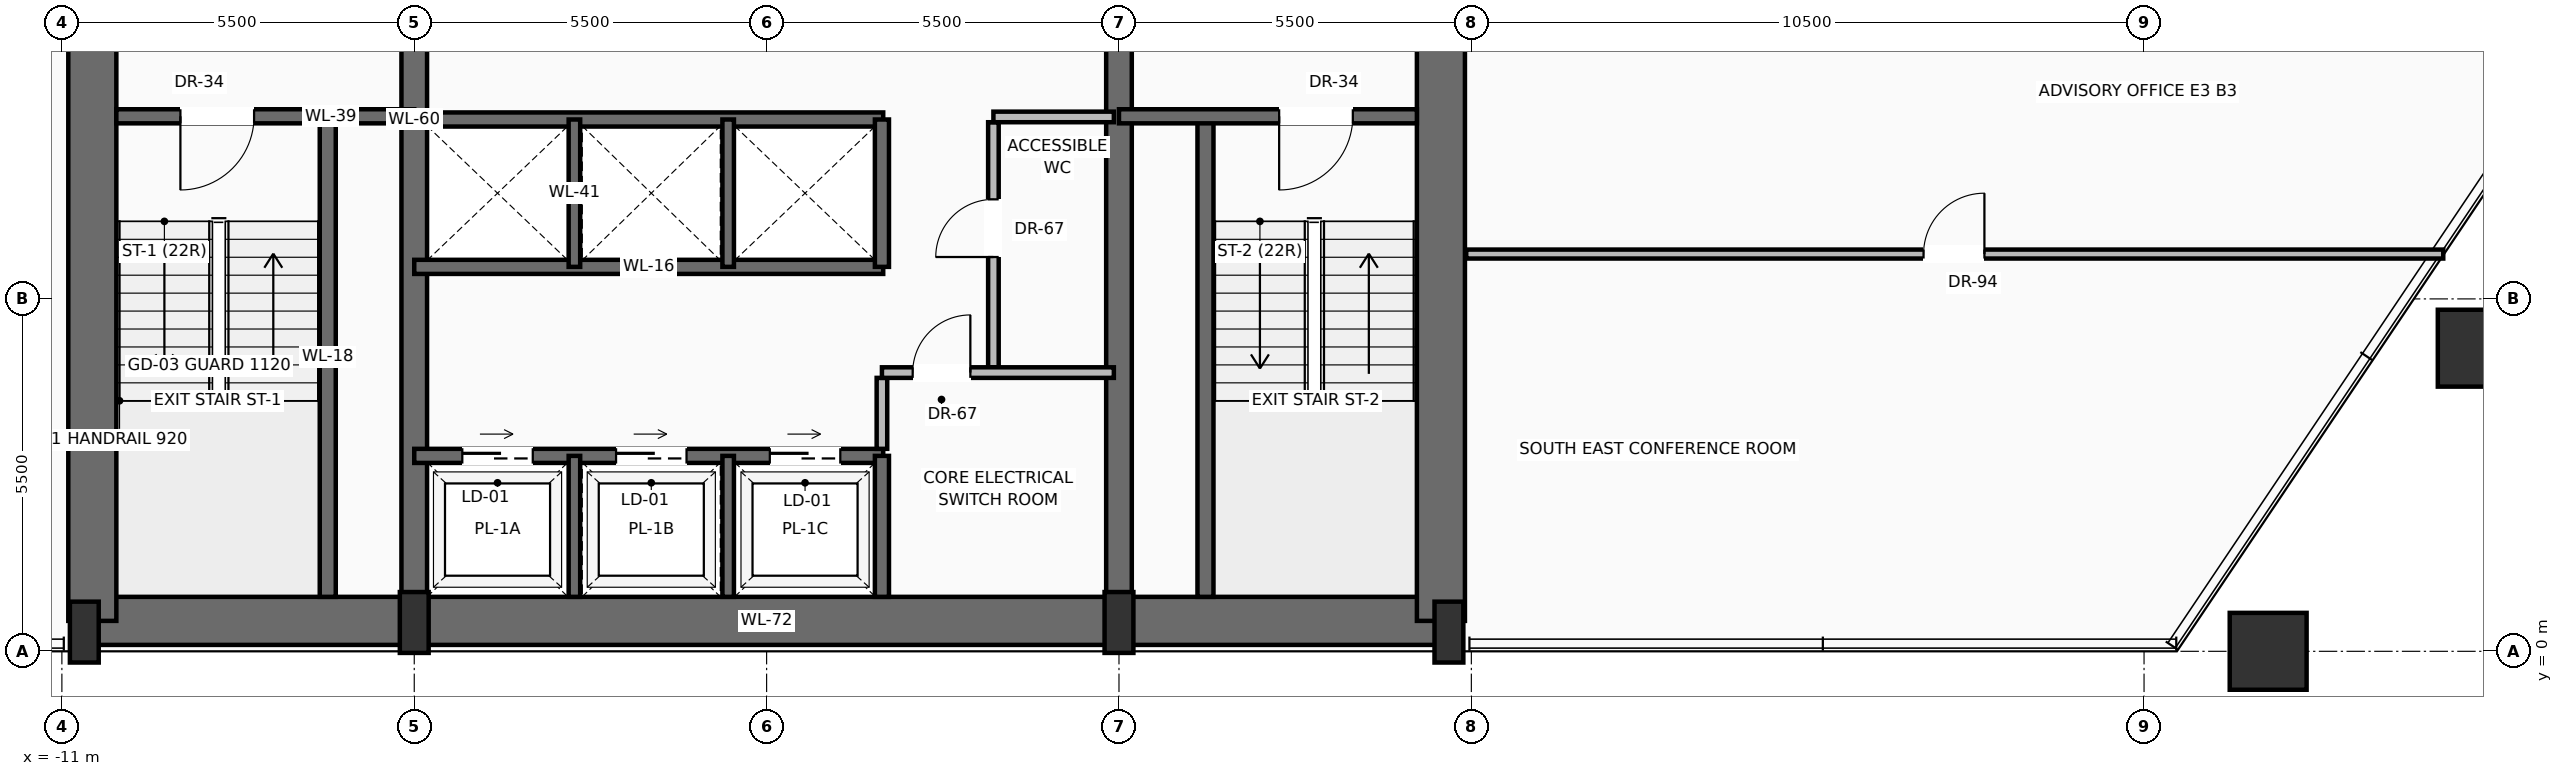
"""IFC4 building model, lengths in metres.
Left out: names, types, materials, properties, quantities, classifications, styles, units other than length and angle.
Written with IfcOpenShell. Run it as: python <this file> out.ifc"""

import sys

from ifc_helpers import new_model, si_unit, direction, frame, frame_2d, origin, origin_2d, place, context, subcontext, project, spatial, rectangle, hollow_rectangle, extrude, source, transform, mapped, element, fill, save


model = new_model("IFC4")
c1 = context("Model", 3, precision=1e-05, world=origin(), true_north=direction((0.0, 1.0)))
c2 = subcontext(c1, "Body", "Model", "MODEL_VIEW")
j1 = project(units=[si_unit("LENGTHUNIT", "METRE"), si_unit("PLANEANGLEUNIT", "RADIAN")], contexts=[c1])
p1 = place(None, origin())
s1 = spatial("IfcSite", under=j1, at=p1, CompositionType="ELEMENT")
p2 = place(p1, origin())
s2 = spatial("IfcBuilding", under=s1, at=p2, CompositionType="ELEMENT")
p3 = place(p2, frame((0.0, 0.0, 95.1)))
s3 = spatial("IfcBuildingStorey", under=s2, at=p3, CompositionType="ELEMENT", Elevation=95.1)
p4 = place(p3, frame((-10.65, 0.475, 0.0), z_axis=(0.0, 0.0, 1.0), x_axis=(1.0, 0.0, 0.0)))
e1 = element("IfcWall", 1, at=p4, inside=s3, PredefinedType="SHEAR", context=c2, shape_type="SweptSolid", body=[
    extrude(rectangle(XDim=21.3, YDim=0.75, at=frame_2d((10.65, 0.0))), origin(), (0.0, 0.0, 1.0), 3.45),
])
for number, where, z_axis, x_axis in (
    (2, (-10.525, 0.475, 0.0), (0.0, 0.0, 1.0), (0.0, 1.0, 0.0)),
    (3, (10.525, 0.475, 0.0), (0.0, 0.0, 1.0), (0.0, 1.0, 0.0)),
):
    element("IfcWall", number, at=place(p3, frame(where, z_axis=z_axis, x_axis=x_axis)), inside=s3, PredefinedType="SHEAR", context=c2, shape_type="SweptSolid", body=[
        extrude(rectangle(XDim=15.65, YDim=0.75, at=frame_2d((7.825, 0.0))), origin(), (0.0, 0.0, 1.0), 3.45),
    ])
p5 = place(p3, frame((-5.5, 0.475, 0.0), z_axis=(0.0, 0.0, 1.0), x_axis=(0.0, 1.0, 0.0)))
e4 = element("IfcWall", 4, at=p5, inside=s3, PredefinedType="SHEAR", context=c2, shape_type="SweptSolid", body=[
    extrude(rectangle(XDim=15.65, YDim=0.4, at=frame_2d((7.825, 0.0))), origin(), (0.0, 0.0, 1.0), 3.45),
])
p6 = place(p5, frame((9.025, 0.0, 0.0)))
e5 = element("IfcOpeningElement", 5, at=p6, cuts=e4, PredefinedType="OPENING", context=c2, shape_type="SweptSolid", body=[
    extrude(rectangle(XDim=1.1, YDim=2.2, at=frame_2d((0.55, 1.1))), frame((0.0, 0.21, 0.0), z_axis=(0.0, -1.0, 0.0), x_axis=(1.0, 0.0, 0.0)), (0.0, 0.0, 1.0), 0.42),
])
p7 = place(p3, frame((5.5, 0.475, 0.0), z_axis=(0.0, 0.0, 1.0), x_axis=(0.0, 1.0, 0.0)))
e6 = element("IfcWall", 6, at=p7, inside=s3, PredefinedType="SHEAR", context=c2, shape_type="SweptSolid", body=[
    extrude(rectangle(XDim=15.65, YDim=0.4, at=frame_2d((7.825, 0.0))), origin(), (0.0, 0.0, 1.0), 3.45),
])
p8 = place(p7, frame((9.025, 0.0, 0.0)))
e7 = element("IfcOpeningElement", 7, at=p8, cuts=e6, PredefinedType="OPENING", context=c2, shape_type="SweptSolid", body=[
    extrude(rectangle(XDim=1.1, YDim=2.2, at=frame_2d((0.55, 1.1))), frame((0.0, 0.21, 0.0), z_axis=(0.0, -1.0, 0.0), x_axis=(1.0, 0.0, 0.0)), (0.0, 0.0, 1.0), 0.42),
])
m1 = source(origin(), c2, "Body", "SweptSolid", [
    extrude(rectangle(XDim=0.45, YDim=0.95, at=origin_2d()), origin(), (0.0, 0.0, 1.0), 3.7),
])
for number, where, z_axis, x_axis in (
    (8, (-10.65, 0.3, 0.0), (0.0, 0.0, 1.0), (1.0, 0.0, 0.0)),
    (9, (-5.5, 0.45, 0.0), (0.0, 0.0, 1.0), (1.0, 0.0, 0.0)),
    (10, (5.5, 0.45, 0.0), (0.0, 0.0, 1.0), (1.0, 0.0, 0.0)),
    (11, (10.65, 0.3, 0.0), (0.0, 0.0, 1.0), (1.0, 0.0, 0.0)),
):
    element("IfcColumn", number, at=place(p3, frame(where, z_axis=z_axis, x_axis=x_axis)), inside=s3, PredefinedType="PILASTER", context=c2, shape_type="MappedRepresentation", body=[
        mapped(m1, transform((0.0, 0.0, 0.0), scale=1.0)),
    ])
m2 = source(origin(), c2, "Body", "SweptSolid", [
    extrude(hollow_rectangle(XDim=1.2, YDim=1.2, WallThickness=0.06, at=origin_2d()), origin(), (0.0, 0.0, 1.0), 3.691),
])
p9 = place(p3, frame((23.437, 0.0, 0.004), z_axis=(0.012036961087, 0.0, 0.99992755316), x_axis=(0.0, 1.0, 0.0)))
e12 = element("IfcColumn", 12, at=p9, inside=s3, PredefinedType="COLUMN", context=c2, shape_type="MappedRepresentation", body=[
    mapped(m2, transform((0.0, 0.0, 0.0), scale=1.0)),
])
m3 = source(origin(), c2, "Body", "SweptSolid", [
    extrude(hollow_rectangle(XDim=1.2, YDim=1.2, WallThickness=0.06, at=origin_2d()), origin(), (0.0, 0.0, 1.0), 3.692),
])
p10 = place(p3, frame((26.685, 4.731, 0.004), z_axis=(-0.000396800785, -0.016004298321, 0.99987184428), x_axis=(0.999692785574, -0.024785771543, 0.0)))
e13 = element("IfcColumn", 13, at=p10, inside=s3, PredefinedType="COLUMN", context=c2, shape_type="MappedRepresentation", body=[
    mapped(m3, transform((0.0, 0.0, 0.0), scale=1.0)),
])
p11 = place(p3, frame((-6.85, 0.85, 0.0), z_axis=(0.0, 0.0, 1.0), x_axis=(0.0, 1.0, 0.0)))
e14 = element("IfcWall", 14, at=p11, inside=s3, PredefinedType="SOLIDWALL", context=c2, shape_type="SweptSolid", body=[
    extrude(rectangle(XDim=7.5, YDim=0.25, at=frame_2d((3.75, 0.0))), origin(), (0.0, 0.0, 1.0), 3.45),
])
p12 = place(p3, frame((-5.5, 8.35, 0.0), z_axis=(0.0, 0.0, 1.0), x_axis=(-1.0, 0.0, 0.0)))
e15 = element("IfcWall", 15, at=p12, inside=s3, PredefinedType="SOLIDWALL", context=c2, shape_type="SweptSolid", body=[
    extrude(rectangle(XDim=4.65, YDim=0.22, at=frame_2d((2.325, 0.0))), origin(), (0.0, 0.0, 1.0), 3.45),
])
p13 = place(p12, frame((2.5, 0.0, 0.0)))
e16 = element("IfcOpeningElement", 16, at=p13, cuts=e15, PredefinedType="OPENING", context=c2, shape_type="SweptSolid", body=[
    extrude(rectangle(XDim=1.15, YDim=2.2, at=frame_2d((0.575, 1.1))), frame((0.0, 0.12, 0.0), z_axis=(0.0, -1.0, 0.0), x_axis=(1.0, 0.0, 0.0)), (0.0, 0.0, 1.0), 0.24),
])
p14 = place(p3, frame((6.85, 0.85, 0.0), z_axis=(0.0, 0.0, 1.0), x_axis=(0.0, 1.0, 0.0)))
e17 = element("IfcWall", 17, at=p14, inside=s3, PredefinedType="SOLIDWALL", context=c2, shape_type="SweptSolid", body=[
    extrude(rectangle(XDim=7.5, YDim=0.25, at=frame_2d((3.75, 0.0))), origin(), (0.0, 0.0, 1.0), 3.45),
])
p15 = place(p3, frame((10.15, 8.35, 0.0), z_axis=(0.0, 0.0, 1.0), x_axis=(-1.0, 0.0, 0.0)))
e18 = element("IfcWall", 18, at=p15, inside=s3, PredefinedType="SOLIDWALL", context=c2, shape_type="SweptSolid", body=[
    extrude(rectangle(XDim=4.65, YDim=0.22, at=frame_2d((2.325, 0.0))), origin(), (0.0, 0.0, 1.0), 3.45),
])
p16 = place(p15, frame((1.0, 0.0, 0.0)))
e19 = element("IfcOpeningElement", 19, at=p16, cuts=e18, PredefinedType="OPENING", context=c2, shape_type="SweptSolid", body=[
    extrude(rectangle(XDim=1.15, YDim=2.2, at=frame_2d((0.575, 1.1))), frame((0.0, 0.12, 0.0), z_axis=(0.0, -1.0, 0.0), x_axis=(1.0, 0.0, 0.0)), (0.0, 0.0, 1.0), 0.24),
])
p17 = place(p3, frame((-5.5, 3.05, 0.0), z_axis=(0.0, 0.0, 1.0), x_axis=(1.0, 0.0, 0.0)))
e20 = element("IfcWall", 20, at=p17, inside=s3, PredefinedType="SOLIDWALL", context=c2, shape_type="SweptSolid", body=[
    extrude(rectangle(XDim=7.32, YDim=0.22, at=frame_2d((3.66, 0.0))), origin(), (0.0, 0.0, 1.0), 3.45),
])
p18 = place(p17, frame((0.75, 0.0, 0.0)))
e21 = element("IfcOpeningElement", 21, at=p18, cuts=e20, PredefinedType="OPENING", context=c2, shape_type="SweptSolid", body=[
    extrude(rectangle(XDim=1.1, YDim=2.2, at=frame_2d((0.55, 1.1))), frame((0.0, 0.12, 0.0), z_axis=(0.0, -1.0, 0.0), x_axis=(1.0, 0.0, 0.0)), (0.0, 0.0, 1.0), 0.24),
])
p19 = place(p17, frame((3.15, 0.0, 0.0)))
e22 = element("IfcOpeningElement", 22, at=p19, cuts=e20, PredefinedType="OPENING", context=c2, shape_type="SweptSolid", body=[
    extrude(rectangle(XDim=1.1, YDim=2.2, at=frame_2d((0.55, 1.1))), frame((0.0, 0.12, 0.0), z_axis=(0.0, -1.0, 0.0), x_axis=(1.0, 0.0, 0.0)), (0.0, 0.0, 1.0), 0.24),
])
p20 = place(p17, frame((5.55, 0.0, 0.0)))
e23 = element("IfcOpeningElement", 23, at=p20, cuts=e20, PredefinedType="OPENING", context=c2, shape_type="SweptSolid", body=[
    extrude(rectangle(XDim=1.1, YDim=2.2, at=frame_2d((0.55, 1.1))), frame((0.0, 0.12, 0.0), z_axis=(0.0, -1.0, 0.0), x_axis=(1.0, 0.0, 0.0)), (0.0, 0.0, 1.0), 0.24),
])
p21 = place(p3, frame((1.8, 0.85, 0.0), z_axis=(0.0, 0.0, 1.0), x_axis=(0.0, 1.0, 0.0)))
e24 = element("IfcWall", 24, at=p21, inside=s3, PredefinedType="SOLIDWALL", context=c2, shape_type="SweptSolid", body=[
    extrude(rectangle(XDim=2.2, YDim=0.22, at=frame_2d((1.1, 0.0))), origin(), (0.0, 0.0, 1.0), 3.45),
])
for number, where, z_axis, x_axis in (
    (25, (-3.0, 0.85, 0.0), (0.0, 0.0, 1.0), (0.0, 1.0, 0.0)),
    (26, (-0.6, 0.85, 0.0), (0.0, 0.0, 1.0), (0.0, 1.0, 0.0)),
):
    element("IfcWall", number, at=place(p3, frame(where, z_axis=z_axis, x_axis=x_axis)), inside=s3, PredefinedType="SOLIDWALL", context=c2, shape_type="SweptSolid", body=[
        extrude(rectangle(XDim=2.2, YDim=0.18, at=frame_2d((1.1, 0.0))), origin(), (0.0, 0.0, 1.0), 3.45),
    ])
p22 = place(p3, frame((1.8, 3.16, 0.0), z_axis=(0.0, 0.0, 1.0), x_axis=(0.0, 1.0, 0.0)))
e27 = element("IfcWall", 27, at=p22, inside=s3, PredefinedType="PARTITIONING", context=c2, shape_type="SweptSolid", body=[
    extrude(rectangle(XDim=1.108, YDim=0.165, at=frame_2d((0.554, 0.0))), origin(), (0.0, 0.0, 1.0), 3.442),
])
p23 = place(p3, frame((3.54, 4.433, 0.0), z_axis=(0.0, 0.0, 1.0), x_axis=(0.0, 1.0, 0.0)))
e28 = element("IfcWall", 28, at=p23, inside=s3, PredefinedType="PARTITIONING", context=c2, shape_type="SweptSolid", body=[
    extrude(rectangle(XDim=3.825, YDim=0.165, at=frame_2d((1.913, 0.0))), origin(), (0.0, 0.0, 1.0), 3.442),
])
p24 = place(p23, frame((1.721, 0.0, 0.0)))
e29 = element("IfcOpeningElement", 29, at=p24, cuts=e28, PredefinedType="OPENING", context=c2, shape_type="SweptSolid", body=[
    extrude(rectangle(XDim=0.9, YDim=2.1, at=frame_2d((0.45, 1.05))), frame((0.0, 0.093, 0.0), z_axis=(0.0, -1.0, 0.0), x_axis=(1.0, 0.0, 0.0)), (0.0, 0.0, 1.0), 0.185),
])
p25 = place(p3, frame((3.54, 8.34, 0.0), z_axis=(0.0, 0.0, 1.0), x_axis=(1.0, 0.0, 0.0)))
e30 = element("IfcWall", 30, at=p25, inside=s3, PredefinedType="PARTITIONING", context=c2, shape_type="SweptSolid", body=[
    extrude(rectangle(XDim=1.88, YDim=0.165, at=frame_2d((0.94, 0.0))), origin(), (0.0, 0.0, 1.0), 3.442),
])
p26 = place(p3, frame((1.8, 4.35, 0.0), z_axis=(0.0, 0.0, 1.0), x_axis=(1.0, 0.0, 0.0)))
e31 = element("IfcWall", 31, at=p26, inside=s3, PredefinedType="PARTITIONING", context=c2, shape_type="SweptSolid", body=[
    extrude(rectangle(XDim=3.62, YDim=0.165, at=frame_2d((1.81, 0.0))), origin(), (0.0, 0.0, 1.0), 3.442),
])
p27 = place(p26, frame((0.48, 0.0, 0.0)))
e32 = element("IfcOpeningElement", 32, at=p27, cuts=e31, PredefinedType="OPENING", context=c2, shape_type="SweptSolid", body=[
    extrude(rectangle(XDim=0.9, YDim=2.1, at=frame_2d((0.45, 1.05))), frame((0.0, 0.093, 0.0), z_axis=(0.0, -1.0, 0.0), x_axis=(1.0, 0.0, 0.0)), (0.0, 0.0, 1.0), 0.185),
])
for number, where, z_axis, x_axis in (
    (33, (-5.5, 6.0, 0.0), (0.0, 0.0, 1.0), (1.0, 0.0, 0.0)),
    (34, (-5.5, 8.3, 0.0), (0.0, 0.0, 1.0), (1.0, 0.0, 0.0)),
):
    element("IfcWall", number, at=place(p3, frame(where, z_axis=z_axis, x_axis=x_axis)), inside=s3, PredefinedType="SOLIDWALL", context=c2, shape_type="SweptSolid", body=[
        extrude(rectangle(XDim=7.32, YDim=0.22, at=frame_2d((3.66, 0.0))), origin(), (0.0, 0.0, 1.0), 3.45),
    ])
p28 = place(p3, frame((1.8, 6.0, 0.0), z_axis=(0.0, 0.0, 1.0), x_axis=(0.0, 1.0, 0.0)))
e35 = element("IfcWall", 35, at=p28, inside=s3, PredefinedType="SOLIDWALL", context=c2, shape_type="SweptSolid", body=[
    extrude(rectangle(XDim=2.3, YDim=0.22, at=frame_2d((1.15, 0.0))), origin(), (0.0, 0.0, 1.0), 3.45),
])
for number, where, z_axis, x_axis in (
    (36, (-3.0, 6.0, 0.0), (0.0, 0.0, 1.0), (0.0, 1.0, 0.0)),
    (37, (-0.6, 6.0, 0.0), (0.0, 0.0, 1.0), (0.0, 1.0, 0.0)),
):
    element("IfcWall", number, at=place(p3, frame(where, z_axis=z_axis, x_axis=x_axis)), inside=s3, PredefinedType="SOLIDWALL", context=c2, shape_type="SweptSolid", body=[
        extrude(rectangle(XDim=2.3, YDim=0.18, at=frame_2d((1.15, 0.0))), origin(), (0.0, 0.0, 1.0), 3.45),
    ])
p29 = place(p3, frame((10.92, 6.2, 0.0), z_axis=(0.0, 0.0, 1.0), x_axis=(1.0, 0.0, 0.0)))
e38 = element("IfcWall", 38, at=p29, inside=s3, PredefinedType="PARTITIONING", context=c2, shape_type="SweptSolid", body=[
    extrude(rectangle(XDim=15.25, YDim=0.14, at=frame_2d((7.625, 0.0))), origin(), (0.0, 0.0, 1.0), 2.979),
])
p30 = place(p29, frame((7.138, 0.0, 0.0)))
e39 = element("IfcOpeningElement", 39, at=p30, cuts=e38, PredefinedType="OPENING", context=c2, shape_type="SweptSolid", body=[
    extrude(rectangle(XDim=0.95, YDim=2.2, at=frame_2d((0.475, 1.1))), frame((0.0, 0.08, 0.0), z_axis=(0.0, -1.0, 0.0), x_axis=(1.0, 0.0, 0.0)), (0.0, 0.0, 1.0), 0.16),
])
m4 = source(origin(), c2, "Body", "SweptSolid", [
    extrude(rectangle(XDim=1.15, YDim=2.2, at=frame_2d((0.575, 1.1))), frame((0.0, 0.025, 0.0), z_axis=(0.0, -1.0, 0.0), x_axis=(1.0, 0.0, 0.0)), (0.0, 0.0, 1.0), 0.05),
])
p31 = place(p13, origin())
e40 = element("IfcDoor", 40, at=p31, inside=s3, OperationType="SINGLE_SWING_RIGHT", PredefinedType="DOOR", context=c2, shape_type="MappedRepresentation", body=[
    mapped(m4, transform((0.0, 0.0, 0.0), scale=1.0)),
])
fill(e16, e40)
p32 = place(p16, origin())
e41 = element("IfcDoor", 41, at=p32, inside=s3, OperationType="SINGLE_SWING_RIGHT", PredefinedType="DOOR", context=c2, shape_type="MappedRepresentation", body=[
    mapped(m4, transform((0.0, 0.0, 0.0), scale=1.0)),
])
fill(e19, e41)
m5 = source(origin(), c2, "Body", "SweptSolid", [
    extrude(rectangle(XDim=1.1, YDim=2.2, at=frame_2d((0.55, 1.1))), frame((0.0, 0.025, 0.0), z_axis=(0.0, -1.0, 0.0), x_axis=(1.0, 0.0, 0.0)), (0.0, 0.0, 1.0), 0.05),
])
p33 = place(p18, origin())
e42 = element("IfcDoor", 42, at=p33, inside=s3, OperationType="SLIDING_TO_RIGHT", PredefinedType="DOOR", context=c2, shape_type="MappedRepresentation", body=[
    mapped(m5, transform((0.0, 0.0, 0.0), scale=1.0)),
])
fill(e21, e42)
p34 = place(p19, origin())
e43 = element("IfcDoor", 43, at=p34, inside=s3, OperationType="SLIDING_TO_RIGHT", PredefinedType="DOOR", context=c2, shape_type="MappedRepresentation", body=[
    mapped(m5, transform((0.0, 0.0, 0.0), scale=1.0)),
])
fill(e22, e43)
p35 = place(p20, origin())
e44 = element("IfcDoor", 44, at=p35, inside=s3, OperationType="SLIDING_TO_RIGHT", PredefinedType="DOOR", context=c2, shape_type="MappedRepresentation", body=[
    mapped(m5, transform((0.0, 0.0, 0.0), scale=1.0)),
])
fill(e23, e44)
m6 = source(origin(), c2, "Body", "SweptSolid", [
    extrude(rectangle(XDim=0.9, YDim=2.1, at=frame_2d((0.45, 1.05))), frame((0.0, 0.025, 0.0), z_axis=(0.0, -1.0, 0.0), x_axis=(1.0, 0.0, 0.0)), (0.0, 0.0, 1.0), 0.05),
])
p36 = place(p27, origin())
e45 = element("IfcDoor", 45, at=p36, inside=s3, OperationType="SINGLE_SWING_RIGHT", PredefinedType="DOOR", context=c2, shape_type="MappedRepresentation", body=[
    mapped(m6, transform((0.0, 0.0, 0.0), scale=1.0)),
])
fill(e32, e45)
p37 = place(p24, origin())
e46 = element("IfcDoor", 46, at=p37, inside=s3, OperationType="SINGLE_SWING_LEFT", PredefinedType="DOOR", context=c2, shape_type="MappedRepresentation", body=[
    mapped(m6, transform((0.0, 0.0, 0.0), scale=1.0)),
])
fill(e29, e46)
m7 = source(origin(), c2, "Body", "SweptSolid", [
    extrude(rectangle(XDim=0.95, YDim=2.2, at=frame_2d((0.475, 1.1))), frame((0.0, 0.025, 0.0), z_axis=(0.0, -1.0, 0.0), x_axis=(1.0, 0.0, 0.0)), (0.0, 0.0, 1.0), 0.05),
])
p38 = place(p30, origin())
e47 = element("IfcDoor", 47, at=p38, inside=s3, OperationType="SINGLE_SWING_RIGHT", PredefinedType="DOOR", context=c2, shape_type="MappedRepresentation", body=[
    mapped(m7, transform((0.0, 0.0, 0.0), scale=1.0)),
])
fill(e39, e47)
save(model, sys.argv[1])
